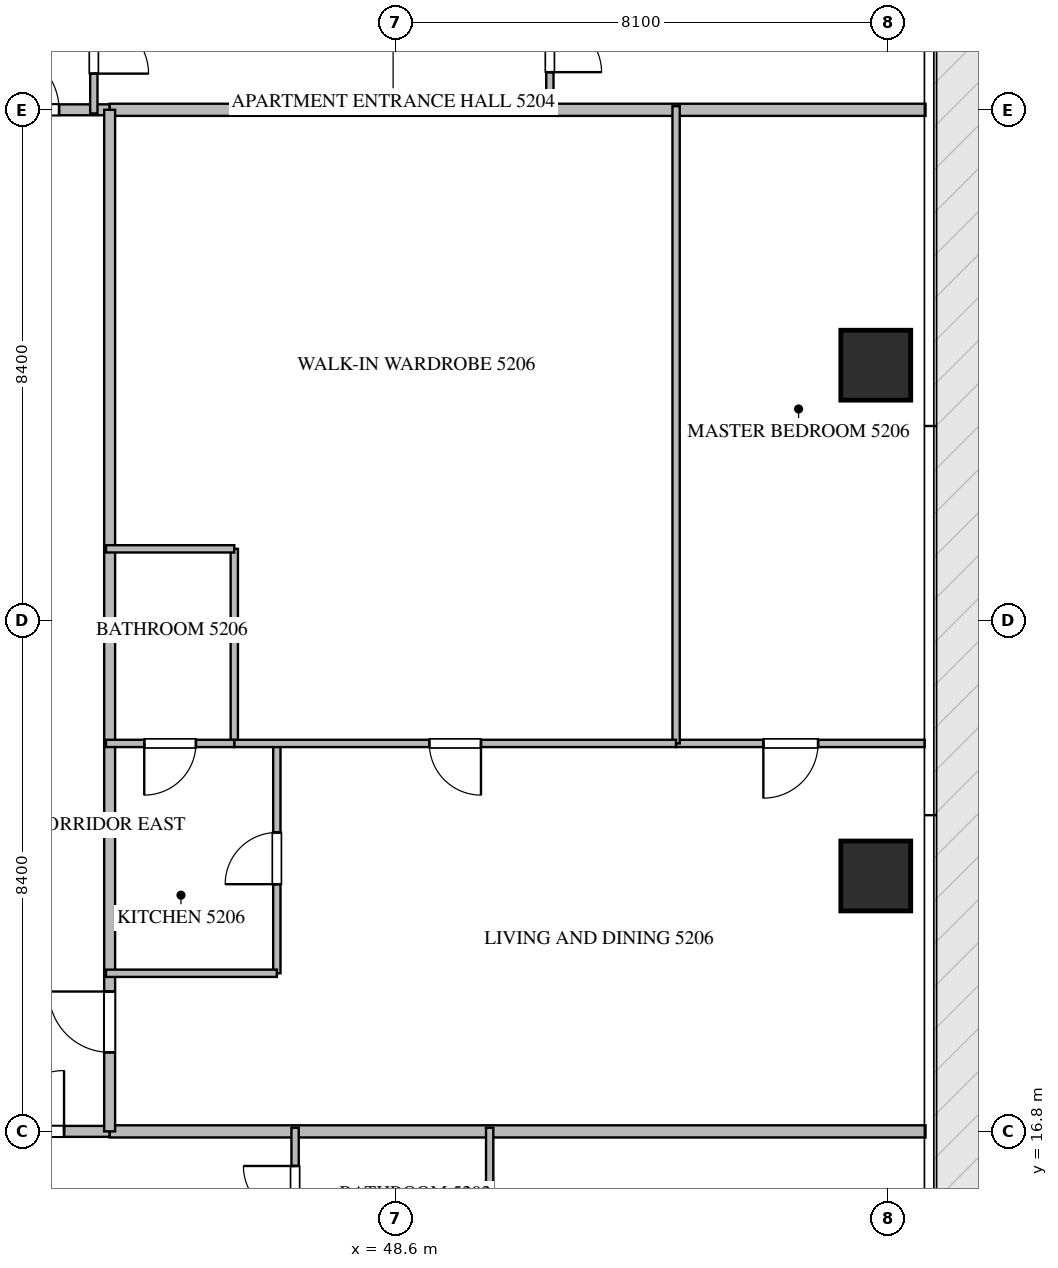
"""IFC4 building model, lengths in metres.
Left out: names, types, materials, properties, quantities, classifications, styles, units other than length and angle.
Written with IfcOpenShell. Run it as: python <this file> out.ifc"""

import sys

from ifc_helpers import new_model, si_unit, direction, frame, frame_2d, origin, origin_2d, place, context, subcontext, project, spatial, rectangle, extrude, source, transform, mapped, element, fill, save


model = new_model("IFC4")
c1 = context("Model", 3, precision=1e-05, world=origin(), true_north=direction((0.0, 1.0)))
c2 = subcontext(c1, "Body", "Model", "MODEL_VIEW")
j1 = project(units=[si_unit("LENGTHUNIT", "METRE"), si_unit("PLANEANGLEUNIT", "RADIAN")], contexts=[c1])
p1 = place(None, origin())
s1 = spatial("IfcSite", under=j1, at=p1, CompositionType="ELEMENT")
p2 = place(p1, origin())
s2 = spatial("IfcBuilding", under=s1, at=p2, CompositionType="ELEMENT")
p3 = place(p2, frame((0.0, 0.0, 210.45)))
s3 = spatial("IfcBuildingStorey", under=s2, at=p3, CompositionType="ELEMENT", Elevation=210.45)
m1 = source(origin(), c2, "Body", "SweptSolid", [
    extrude(rectangle(XDim=1.15, YDim=1.15, at=origin_2d()), origin(), (0.0, 0.0, 1.0), 4.03),
])
for number, where, z_axis, x_axis in (
    (1, (56.5, 21.0, -0.44), (0.0, 0.0, 1.0), (1.0, 0.0, 0.0)),
    (2, (56.5, 29.4, -0.44), (0.0, 0.0, 1.0), (1.0, 0.0, 0.0)),
):
    element("IfcColumn", number, at=place(p3, frame(where, z_axis=z_axis, x_axis=x_axis)), inside=s3, PredefinedType="COLUMN", context=c2, shape_type="MappedRepresentation", body=[
        mapped(m1, transform((0.0, 0.0, 0.0), scale=1.0)),
    ])
for number, where, z_axis, x_axis in (
    (3, (43.9, 16.8, 0.0), (0.0, 0.0, 1.0), (1.0, 0.0, 0.0)),
    (4, (43.9, 33.6, 0.0), (0.0, 0.0, 1.0), (1.0, 0.0, 0.0)),
):
    element("IfcWall", number, at=place(p3, frame(where, z_axis=z_axis, x_axis=x_axis)), inside=s3, PredefinedType="PARTITIONING", context=c2, shape_type="SweptSolid", body=[
        extrude(rectangle(XDim=13.418, YDim=0.2, at=frame_2d((6.709, 0.0))), origin(), (0.0, 0.0, 1.0), 3.59),
    ])
p4 = place(p3, frame((41.402, 16.8, 0.0), z_axis=(0.0, 0.0, 1.0), x_axis=(1.0, 0.0, 0.0)))
e5 = element("IfcWall", 5, at=p4, inside=s3, PredefinedType="PARTITIONING", context=c2, shape_type="SweptSolid", body=[
    extrude(rectangle(XDim=2.496, YDim=0.18, at=frame_2d((1.248, 0.0))), origin(), (0.0, 0.0, 1.0), 3.59),
])
p5 = place(p4, frame((0.748, 0.0, 0.0)))
e6 = element("IfcOpeningElement", 6, at=p5, cuts=e5, PredefinedType="OPENING", context=c2, shape_type="SweptSolid", body=[
    extrude(rectangle(XDim=1.0, YDim=2.15, at=frame_2d((0.5, 1.075))), frame((0.0, 0.1, 0.0), z_axis=(0.0, -1.0, 0.0), x_axis=(1.0, 0.0, 0.0)), (0.0, 0.0, 1.0), 0.2),
])
p6 = place(p3, frame((41.402, 33.6, 0.0), z_axis=(0.0, 0.0, 1.0), x_axis=(1.0, 0.0, 0.0)))
e7 = element("IfcWall", 7, at=p6, inside=s3, PredefinedType="PARTITIONING", context=c2, shape_type="SweptSolid", body=[
    extrude(rectangle(XDim=2.496, YDim=0.18, at=frame_2d((1.248, 0.0))), origin(), (0.0, 0.0, 1.0), 3.59),
])
p7 = place(p6, frame((0.666, 0.0, 0.0)))
e8 = element("IfcOpeningElement", 8, at=p7, cuts=e7, PredefinedType="OPENING", context=c2, shape_type="SweptSolid", body=[
    extrude(rectangle(XDim=1.0, YDim=2.15, at=frame_2d((0.5, 1.075))), frame((0.0, 0.1, 0.0), z_axis=(0.0, -1.0, 0.0), x_axis=(1.0, 0.0, 0.0)), (0.0, 0.0, 1.0), 0.2),
])
p8 = place(p3, frame((43.9, 16.8, 0.0), z_axis=(0.0, 0.0, 1.0), x_axis=(0.0, 1.0, 0.0)))
e9 = element("IfcWall", 9, at=p8, inside=s3, PredefinedType="PARTITIONING", context=c2, shape_type="SweptSolid", body=[
    extrude(rectangle(XDim=16.8, YDim=0.18, at=frame_2d((8.4, 0.0))), origin(), (0.0, 0.0, 1.0), 3.59),
])
p9 = place(p8, frame((1.3, 0.0, 0.0)))
e10 = element("IfcOpeningElement", 10, at=p9, cuts=e9, PredefinedType="OPENING", context=c2, shape_type="SweptSolid", body=[
    extrude(rectangle(XDim=1.0, YDim=2.15, at=frame_2d((0.5, 1.075))), frame((0.0, 0.1, 0.0), z_axis=(0.0, -1.0, 0.0), x_axis=(1.0, 0.0, 0.0)), (0.0, 0.0, 1.0), 0.2),
])
p10 = place(p3, frame((50.15, 14.75, 0.0), z_axis=(0.0, 0.0, 1.0), x_axis=(0.0, 1.0, 0.0)))
e11 = element("IfcWall", 11, at=p10, inside=s3, PredefinedType="PARTITIONING", context=c2, shape_type="SweptSolid", body=[
    extrude(rectangle(XDim=2.11, YDim=0.12, at=frame_2d((1.055, 0.0))), origin(), (0.0, 0.0, 1.0), 3.59),
])
p11 = place(p3, frame((46.95, 14.752, 0.0), z_axis=(0.0, 0.0, 1.0), x_axis=(0.0, 1.0, 0.0)))
e12 = element("IfcWall", 12, at=p11, inside=s3, PredefinedType="PARTITIONING", context=c2, shape_type="SweptSolid", body=[
    extrude(rectangle(XDim=2.108, YDim=0.12, at=frame_2d((1.054, 0.0))), origin(), (0.0, 0.0, 1.0), 3.59),
])
p12 = place(p11, frame((0.629, 0.0, 0.0)))
e13 = element("IfcOpeningElement", 13, at=p12, cuts=e12, PredefinedType="OPENING", context=c2, shape_type="SweptSolid", body=[
    extrude(rectangle(XDim=0.85, YDim=2.1, at=frame_2d((0.425, 1.05))), frame((0.0, 0.07, 0.0), z_axis=(0.0, -1.0, 0.0), x_axis=(1.0, 0.0, 0.0)), (0.0, 0.0, 1.0), 0.14),
])
p13 = place(p3, frame((43.64, 35.75, 0.0), z_axis=(0.0, 0.0, 1.0), x_axis=(0.0, -1.0, 0.0)))
e14 = element("IfcWall", 14, at=p13, inside=s3, PredefinedType="PARTITIONING", context=c2, shape_type="SweptSolid", body=[
    extrude(rectangle(XDim=2.21, YDim=0.12, at=frame_2d((1.105, 0.0))), origin(), (0.0, 0.0, 1.0), 3.59),
])
p14 = place(p13, frame((0.655, 0.0, 0.0)))
e15 = element("IfcOpeningElement", 15, at=p14, cuts=e14, PredefinedType="OPENING", context=c2, shape_type="SweptSolid", body=[
    extrude(rectangle(XDim=0.9, YDim=2.1, at=frame_2d((0.45, 1.05))), frame((0.0, 0.07, 0.0), z_axis=(0.0, -1.0, 0.0), x_axis=(1.0, 0.0, 0.0)), (0.0, 0.0, 1.0), 0.14),
])
p15 = place(p3, frame((51.14, 35.748, 0.0), z_axis=(0.0, 0.0, 1.0), x_axis=(0.0, -1.0, 0.0)))
e16 = element("IfcWall", 16, at=p15, inside=s3, PredefinedType="PARTITIONING", context=c2, shape_type="SweptSolid", body=[
    extrude(rectangle(XDim=2.208, YDim=0.12, at=frame_2d((1.104, 0.0))), origin(), (0.0, 0.0, 1.0), 3.59),
])
p16 = place(p15, frame((0.679, 0.0, 0.0)))
e17 = element("IfcOpeningElement", 17, at=p16, cuts=e16, PredefinedType="OPENING", context=c2, shape_type="SweptSolid", body=[
    extrude(rectangle(XDim=0.85, YDim=2.1, at=frame_2d((0.425, 1.05))), frame((0.0, 0.07, 0.0), z_axis=(0.0, -1.0, 0.0), x_axis=(1.0, 0.0, 0.0)), (0.0, 0.0, 1.0), 0.14),
])
p17 = place(p3, frame((46.65, 19.4, 0.0), z_axis=(0.0, 0.0, 1.0), x_axis=(0.0, 1.0, 0.0)))
e18 = element("IfcWall", 18, at=p17, inside=s3, PredefinedType="PARTITIONING", context=c2, shape_type="SweptSolid", body=[
    extrude(rectangle(XDim=3.78, YDim=0.12, at=frame_2d((1.89, 0.0))), origin(), (0.0, 0.0, 1.0), 3.59),
])
p18 = place(p17, frame((1.465, 0.0, 0.0)))
e19 = element("IfcOpeningElement", 19, at=p18, cuts=e18, PredefinedType="OPENING", context=c2, shape_type="SweptSolid", body=[
    extrude(rectangle(XDim=0.85, YDim=2.1, at=frame_2d((0.425, 1.05))), frame((0.0, 0.07, 0.0), z_axis=(0.0, -1.0, 0.0), x_axis=(1.0, 0.0, 0.0)), (0.0, 0.0, 1.0), 0.14),
])
p19 = place(p3, frame((46.65, 19.4, 0.0), z_axis=(0.0, 0.0, 1.0), x_axis=(-1.0, 0.0, 0.0)))
e20 = element("IfcWall", 20, at=p19, inside=s3, PredefinedType="PARTITIONING", context=c2, shape_type="SweptSolid", body=[
    extrude(rectangle(XDim=2.81, YDim=0.12, at=frame_2d((1.405, 0.0))), origin(), (0.0, 0.0, 1.0), 3.59),
])
p20 = place(p3, frame((57.305, 23.18, 0.0), z_axis=(0.0, 0.0, 1.0), x_axis=(-1.0, 0.0, 0.0)))
e21 = element("IfcWall", 21, at=p20, inside=s3, PredefinedType="PARTITIONING", context=c2, shape_type="SweptSolid", body=[
    extrude(rectangle(XDim=4.089, YDim=0.12, at=frame_2d((2.044, 0.0))), origin(), (0.0, 0.0, 1.0), 3.59),
])
p21 = place(p20, frame((1.754, 0.0, 0.0)))
e22 = element("IfcOpeningElement", 22, at=p21, cuts=e21, PredefinedType="OPENING", context=c2, shape_type="SweptSolid", body=[
    extrude(rectangle(XDim=0.9, YDim=2.1, at=frame_2d((0.45, 1.05))), frame((0.0, 0.07, 0.0), z_axis=(0.0, -1.0, 0.0), x_axis=(1.0, 0.0, 0.0)), (0.0, 0.0, 1.0), 0.14),
])
p22 = place(p3, frame((53.216, 23.18, 0.0), z_axis=(0.0, 0.0, 1.0), x_axis=(0.0, 1.0, 0.0)))
e23 = element("IfcWall", 23, at=p22, inside=s3, PredefinedType="PARTITIONING", context=c2, shape_type="SweptSolid", body=[
    extrude(rectangle(XDim=10.48, YDim=0.12, at=frame_2d((5.24, 0.0))), origin(), (0.0, 0.0, 1.0), 3.59),
])
p23 = place(p3, frame((45.95, 23.18, 0.0), z_axis=(0.0, 0.0, 1.0), x_axis=(0.0, 1.0, 0.0)))
e24 = element("IfcWall", 24, at=p23, inside=s3, PredefinedType="PARTITIONING", context=c2, shape_type="SweptSolid", body=[
    extrude(rectangle(XDim=3.2, YDim=0.12, at=frame_2d((1.6, 0.0))), origin(), (0.0, 0.0, 1.0), 3.59),
])
p24 = place(p3, frame((45.95, 26.38, 0.0), z_axis=(0.0, 0.0, 1.0), x_axis=(-1.0, 0.0, 0.0)))
e25 = element("IfcWall", 25, at=p24, inside=s3, PredefinedType="PARTITIONING", context=c2, shape_type="SweptSolid", body=[
    extrude(rectangle(XDim=2.11, YDim=0.12, at=frame_2d((1.055, 0.0))), origin(), (0.0, 0.0, 1.0), 3.59),
])
p25 = place(p3, frame((53.214, 23.18, 0.0), z_axis=(0.0, 0.0, 1.0), x_axis=(-1.0, 0.0, 0.0)))
e26 = element("IfcWall", 26, at=p25, inside=s3, PredefinedType="PARTITIONING", context=c2, shape_type="SweptSolid", body=[
    extrude(rectangle(XDim=7.264, YDim=0.12, at=frame_2d((3.632, 0.0))), origin(), (0.0, 0.0, 1.0), 3.59),
])
p26 = place(p25, frame((3.207, 0.0, 0.0)))
e27 = element("IfcOpeningElement", 27, at=p26, cuts=e26, PredefinedType="OPENING", context=c2, shape_type="SweptSolid", body=[
    extrude(rectangle(XDim=0.85, YDim=2.1, at=frame_2d((0.425, 1.05))), frame((0.0, 0.07, 0.0), z_axis=(0.0, -1.0, 0.0), x_axis=(1.0, 0.0, 0.0)), (0.0, 0.0, 1.0), 0.14),
])
p27 = place(p3, frame((45.948, 23.18, 0.0), z_axis=(0.0, 0.0, 1.0), x_axis=(-1.0, 0.0, 0.0)))
e28 = element("IfcWall", 28, at=p27, inside=s3, PredefinedType="PARTITIONING", context=c2, shape_type="SweptSolid", body=[
    extrude(rectangle(XDim=2.108, YDim=0.12, at=frame_2d((1.054, 0.0))), origin(), (0.0, 0.0, 1.0), 3.59),
])
p28 = place(p27, frame((0.629, 0.0, 0.0)))
e29 = element("IfcOpeningElement", 29, at=p28, cuts=e28, PredefinedType="OPENING", context=c2, shape_type="SweptSolid", body=[
    extrude(rectangle(XDim=0.85, YDim=2.1, at=frame_2d((0.425, 1.05))), frame((0.0, 0.07, 0.0), z_axis=(0.0, -1.0, 0.0), x_axis=(1.0, 0.0, 0.0)), (0.0, 0.0, 1.0), 0.14),
])
m2 = source(origin(), c2, "Body", "SweptSolid", [
    extrude(rectangle(XDim=1.0, YDim=2.15, at=frame_2d((0.5, 1.075))), frame((0.0, 0.025, 0.0), z_axis=(0.0, -1.0, 0.0), x_axis=(1.0, 0.0, 0.0)), (0.0, 0.0, 1.0), 0.05),
])
p29 = place(p5, origin())
e30 = element("IfcDoor", 30, at=p29, inside=s3, OperationType="SINGLE_SWING_RIGHT", PredefinedType="DOOR", context=c2, shape_type="MappedRepresentation", body=[
    mapped(m2, transform((0.0, 0.0, 0.0), scale=1.0)),
])
fill(e6, e30)
p30 = place(p7, origin())
e31 = element("IfcDoor", 31, at=p30, inside=s3, OperationType="SINGLE_SWING_LEFT", PredefinedType="DOOR", context=c2, shape_type="MappedRepresentation", body=[
    mapped(m2, transform((0.0, 0.0, 0.0), scale=1.0)),
])
fill(e8, e31)
p31 = place(p9, origin())
e32 = element("IfcDoor", 32, at=p31, inside=s3, OperationType="SINGLE_SWING_RIGHT", PredefinedType="DOOR", context=c2, shape_type="MappedRepresentation", body=[
    mapped(m2, transform((0.0, 0.0, 0.0), scale=1.0)),
])
fill(e10, e32)
m3 = source(origin(), c2, "Body", "SweptSolid", [
    extrude(rectangle(XDim=0.85, YDim=2.1, at=frame_2d((0.425, 1.05))), frame((0.0, 0.025, 0.0), z_axis=(0.0, -1.0, 0.0), x_axis=(1.0, 0.0, 0.0)), (0.0, 0.0, 1.0), 0.05),
])
p32 = place(p12, origin())
e33 = element("IfcDoor", 33, at=p32, inside=s3, OperationType="SINGLE_SWING_RIGHT", PredefinedType="DOOR", context=c2, shape_type="MappedRepresentation", body=[
    mapped(m3, transform((0.0, 0.0, 0.0), scale=1.0)),
])
fill(e13, e33)
m4 = source(origin(), c2, "Body", "SweptSolid", [
    extrude(rectangle(XDim=0.9, YDim=2.1, at=frame_2d((0.45, 1.05))), frame((0.0, 0.025, 0.0), z_axis=(0.0, -1.0, 0.0), x_axis=(1.0, 0.0, 0.0)), (0.0, 0.0, 1.0), 0.05),
])
p33 = place(p14, origin())
e34 = element("IfcDoor", 34, at=p33, inside=s3, OperationType="SINGLE_SWING_RIGHT", PredefinedType="DOOR", context=c2, shape_type="MappedRepresentation", body=[
    mapped(m4, transform((0.0, 0.0, 0.0), scale=1.0)),
])
fill(e15, e34)
p34 = place(p16, origin())
e35 = element("IfcDoor", 35, at=p34, inside=s3, OperationType="SINGLE_SWING_RIGHT", PredefinedType="DOOR", context=c2, shape_type="MappedRepresentation", body=[
    mapped(m3, transform((0.0, 0.0, 0.0), scale=1.0)),
])
fill(e17, e35)
p35 = place(p18, origin())
e36 = element("IfcDoor", 36, at=p35, inside=s3, OperationType="SINGLE_SWING_LEFT", PredefinedType="DOOR", context=c2, shape_type="MappedRepresentation", body=[
    mapped(m3, transform((0.0, 0.0, 0.0), scale=1.0)),
])
fill(e19, e36)
p36 = place(p21, origin())
e37 = element("IfcDoor", 37, at=p36, inside=s3, OperationType="SINGLE_SWING_RIGHT", PredefinedType="DOOR", context=c2, shape_type="MappedRepresentation", body=[
    mapped(m4, transform((0.0, 0.0, 0.0), scale=1.0)),
])
fill(e22, e37)
p37 = place(p26, origin())
e38 = element("IfcDoor", 38, at=p37, inside=s3, OperationType="SINGLE_SWING_LEFT", PredefinedType="DOOR", context=c2, shape_type="MappedRepresentation", body=[
    mapped(m3, transform((0.0, 0.0, 0.0), scale=1.0)),
])
fill(e27, e38)
p38 = place(p28, origin())
e39 = element("IfcDoor", 39, at=p38, inside=s3, OperationType="SINGLE_SWING_RIGHT", PredefinedType="DOOR", context=c2, shape_type="MappedRepresentation", body=[
    mapped(m3, transform((0.0, 0.0, 0.0), scale=1.0)),
])
fill(e29, e39)
save(model, sys.argv[1])
